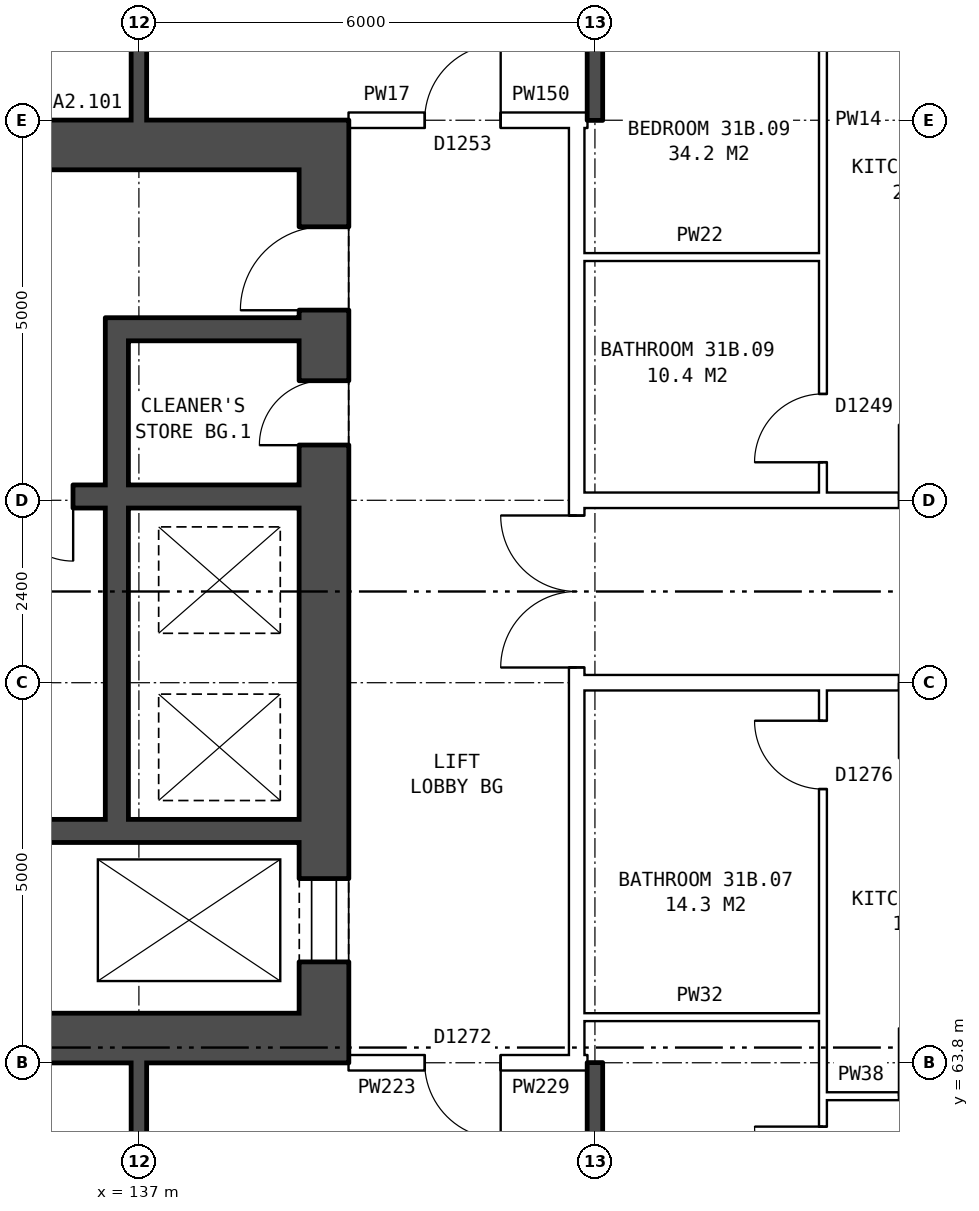
"""IFC4 building model, lengths in metres.
Left out: names, types, materials, properties, quantities, classifications, styles, units other than length and angle.
Written with IfcOpenShell. Run it as: python <this file> out.ifc"""

import sys

from ifc_helpers import new_model, si_unit, direction, frame, frame_2d, origin, place, context, subcontext, project, spatial, rectangle, extrude, element, fill, save


model = new_model("IFC4")
c1 = context("Model", 3, precision=1e-05, world=origin(), true_north=direction((0.0, 1.0)))
c2 = subcontext(c1, "Body", "Model", "MODEL_VIEW")
j1 = project(units=[si_unit("LENGTHUNIT", "METRE"), si_unit("PLANEANGLEUNIT", "RADIAN")], contexts=[c1])
p1 = place(None, origin())
s1 = spatial("IfcSite", under=j1, at=p1, CompositionType="ELEMENT")
p2 = place(p1, origin())
s2 = spatial("IfcBuilding", under=s1, at=p2, CompositionType="ELEMENT")
p3 = place(p2, frame((0.0, 0.0, 111.9)))
s3 = spatial("IfcBuildingStorey", under=s2, at=p3, CompositionType="ELEMENT", Elevation=111.9)
p4 = place(p3, frame((139.435, 64.45, 0.0), z_axis=(0.0, 0.0, 1.0), x_axis=(0.0, 1.0, 0.0)))
e1 = element("IfcWall", 1, at=p4, inside=s3, PredefinedType="SHEAR", context=c2, shape_type="SweptSolid", body=[
    extrude(rectangle(XDim=11.1, YDim=0.65, at=frame_2d((5.55, 0.0))), origin(), (0.0, 0.0, 1.0), 2.85),
])
p5 = place(p4, frame((0.675, 0.0, 0.0)))
e2 = element("IfcOpeningElement", 2, at=p5, cuts=e1, PredefinedType="OPENING", context=c2, shape_type="SweptSolid", body=[
    extrude(rectangle(XDim=1.1, YDim=2.1, at=frame_2d((0.55, 1.05))), frame((0.0, 0.335, 0.0), z_axis=(0.0, -1.0, 0.0), x_axis=(1.0, 0.0, 0.0)), (0.0, 0.0, 1.0), 0.67),
])
p6 = place(p4, frame((9.25, 0.0, 0.0)))
e3 = element("IfcOpeningElement", 3, at=p6, cuts=e1, PredefinedType="OPENING", context=c2, shape_type="SweptSolid", body=[
    extrude(rectangle(XDim=1.1, YDim=2.1, at=frame_2d((0.55, 1.05))), frame((0.0, 0.335, 0.0), z_axis=(0.0, -1.0, 0.0), x_axis=(1.0, 0.0, 0.0)), (0.0, 0.0, 1.0), 0.67),
])
p7 = place(p4, frame((7.475, 0.0, 0.0)))
e4 = element("IfcOpeningElement", 4, at=p7, cuts=e1, PredefinedType="OPENING", context=c2, shape_type="SweptSolid", body=[
    extrude(rectangle(XDim=0.85, YDim=2.1, at=frame_2d((0.425, 1.05))), frame((0.0, 0.335, 0.0), z_axis=(0.0, -1.0, 0.0), x_axis=(1.0, 0.0, 0.0)), (0.0, 0.0, 1.0), 0.67),
])
for number, where, z_axis, x_axis in (
    (5, (139.76, 64.125, 0.0), (0.0, 0.0, 1.0), (-1.0, 0.0, 0.0)),
    (6, (139.76, 75.875, 0.0), (0.0, 0.0, 1.0), (-1.0, 0.0, 0.0)),
):
    element("IfcWall", number, at=place(p3, frame(where, z_axis=z_axis, x_axis=x_axis)), inside=s3, PredefinedType="SHEAR", context=c2, shape_type="SweptSolid", body=[
        extrude(rectangle(XDim=8.4, YDim=0.65, at=frame_2d((4.2, 0.0))), origin(), (0.0, 0.0, 1.0), 2.85),
    ])
p8 = place(p3, frame((139.11, 66.85, 0.0), z_axis=(0.0, 0.0, 1.0), x_axis=(-1.0, 0.0, 0.0)))
e7 = element("IfcWall", 7, at=p8, inside=s3, PredefinedType="SHEAR", context=c2, shape_type="SweptSolid", body=[
    extrude(rectangle(XDim=4.25, YDim=0.3, at=frame_2d((2.125, 0.0))), origin(), (0.0, 0.0, 1.0), 2.85),
])
p9 = place(p3, frame((139.11, 71.25, 0.0), z_axis=(0.0, 0.0, 1.0), x_axis=(-1.0, 0.0, 0.0)))
e8 = element("IfcWall", 8, at=p9, inside=s3, PredefinedType="SHEAR", context=c2, shape_type="SweptSolid", body=[
    extrude(rectangle(XDim=7.1, YDim=0.3, at=frame_2d((3.55, 0.0))), origin(), (0.0, 0.0, 1.0), 2.85),
])
p10 = place(p9, frame((4.7, 0.0, 0.0)))
e9 = element("IfcOpeningElement", 9, at=p10, cuts=e8, PredefinedType="OPENING", context=c2, shape_type="SweptSolid", body=[
    extrude(rectangle(XDim=1.1, YDim=2.1, at=frame_2d((0.55, 1.05))), frame((0.0, 0.16, 0.0), z_axis=(0.0, -1.0, 0.0), x_axis=(1.0, 0.0, 0.0)), (0.0, 0.0, 1.0), 0.32),
])
p11 = place(p9, frame((2.975, 0.0, 0.0)))
e10 = element("IfcOpeningElement", 10, at=p11, cuts=e8, PredefinedType="OPENING", context=c2, shape_type="SweptSolid", body=[
    extrude(rectangle(XDim=0.85, YDim=2.1, at=frame_2d((0.425, 1.05))), frame((0.0, 0.16, 0.0), z_axis=(0.0, -1.0, 0.0), x_axis=(1.0, 0.0, 0.0)), (0.0, 0.0, 1.0), 0.32),
])
p12 = place(p3, frame((139.11, 73.45, 0.0), z_axis=(0.0, 0.0, 1.0), x_axis=(-1.0, 0.0, 0.0)))
e11 = element("IfcWall", 11, at=p12, inside=s3, PredefinedType="SHEAR", context=c2, shape_type="SweptSolid", body=[
    extrude(rectangle(XDim=2.25, YDim=0.3, at=frame_2d((1.125, 0.0))), origin(), (0.0, 0.0, 1.0), 2.85),
])
p13 = place(p3, frame((136.71, 67.0, 0.0), z_axis=(0.0, 0.0, 1.0), x_axis=(0.0, 1.0, 0.0)))
e12 = element("IfcWall", 12, at=p13, inside=s3, PredefinedType="SHEAR", context=c2, shape_type="SweptSolid", body=[
    extrude(rectangle(XDim=4.1, YDim=0.3, at=frame_2d((2.05, 0.0))), origin(), (0.0, 0.0, 1.0), 2.85),
])
p14 = place(p3, frame((136.71, 71.4, 0.0), z_axis=(0.0, 0.0, 1.0), x_axis=(0.0, 1.0, 0.0)))
e13 = element("IfcWall", 13, at=p14, inside=s3, PredefinedType="SHEAR", context=c2, shape_type="SweptSolid", body=[
    extrude(rectangle(XDim=2.2, YDim=0.3, at=frame_2d((1.1, 0.0))), origin(), (0.0, 0.0, 1.0), 2.85),
])
p15 = place(p3, frame((142.76, 63.9, 0.0), z_axis=(0.0, 0.0, 1.0), x_axis=(0.0, 1.0, 0.0)))
e14 = element("IfcWall", 14, at=p15, inside=s3, PredefinedType="PARTITIONING", context=c2, shape_type="SweptSolid", body=[
    extrude(rectangle(XDim=12.2, YDim=0.2, at=frame_2d((6.1, 0.0))), origin(), (0.0, 0.0, 1.0), 2.85),
])
p16 = place(p15, frame((5.1, 0.0, 0.0)))
e15 = element("IfcOpeningElement", 15, at=p16, cuts=e14, PredefinedType="OPENING", context=c2, shape_type="SweptSolid", body=[
    extrude(rectangle(XDim=2.0, YDim=2.1, at=frame_2d((1.0, 1.05))), frame((0.0, 0.11, 0.0), z_axis=(0.0, -1.0, 0.0), x_axis=(1.0, 0.0, 0.0)), (0.0, 0.0, 1.0), 0.22),
])
p17 = place(p3, frame((146.0, 63.36, 0.0), z_axis=(0.0, 0.0, 1.0), x_axis=(1.0, 0.0, 0.0)))
e16 = element("IfcWall", 16, at=p17, inside=s3, PredefinedType="PARTITIONING", context=c2, shape_type="SweptSolid", body=[
    extrude(rectangle(XDim=2.9, YDim=0.1, at=frame_2d((1.45, 0.0))), origin(), (0.0, 0.0, 1.0), 2.85),
])
p18 = place(p17, frame((1.0, 0.0, 0.0)))
e17 = element("IfcOpeningElement", 17, at=p18, cuts=e16, PredefinedType="OPENING", context=c2, shape_type="SweptSolid", body=[
    extrude(rectangle(XDim=0.9, YDim=2.1, at=frame_2d((0.45, 1.05))), frame((0.0, 0.06, 0.0), z_axis=(0.0, -1.0, 0.0), x_axis=(1.0, 0.0, 0.0)), (0.0, 0.0, 1.0), 0.12),
])
p19 = place(p3, frame((139.76, 63.8, 0.0), z_axis=(0.0, 0.0, 1.0), x_axis=(1.0, 0.0, 0.0)))
e18 = element("IfcWall", 18, at=p19, inside=s3, PredefinedType="PARTITIONING", context=c2, shape_type="SweptSolid", body=[
    extrude(rectangle(XDim=3.0, YDim=0.2, at=frame_2d((1.5, 0.0))), origin(), (0.0, 0.0, 1.0), 2.85),
])
p20 = place(p19, frame((1.0, 0.0, 0.0)))
e19 = element("IfcOpeningElement", 19, at=p20, cuts=e18, PredefinedType="OPENING", context=c2, shape_type="SweptSolid", body=[
    extrude(rectangle(XDim=1.0, YDim=2.1, at=frame_2d((0.5, 1.05))), frame((0.0, 0.11, 0.0), z_axis=(0.0, -1.0, 0.0), x_axis=(1.0, 0.0, 0.0)), (0.0, 0.0, 1.0), 0.22),
])
p21 = place(p3, frame((142.76, 63.8, 0.0), z_axis=(0.0, 0.0, 1.0), x_axis=(1.0, 0.0, 0.0)))
e20 = element("IfcWall", 20, at=p21, inside=s3, PredefinedType="PARTITIONING", context=c2, shape_type="SweptSolid", body=[
    extrude(rectangle(XDim=0.14, YDim=0.2, at=frame_2d((0.07, 0.0))), origin(), (0.0, 0.0, 1.0), 2.85),
])
p22 = place(p3, frame((142.76, 64.4, 0.0), z_axis=(0.0, 0.0, 1.0), x_axis=(1.0, 0.0, 0.0)))
e21 = element("IfcWall", 21, at=p22, inside=s3, PredefinedType="PARTITIONING", context=c2, shape_type="SweptSolid", body=[
    extrude(rectangle(XDim=3.24, YDim=0.1, at=frame_2d((1.62, 0.0))), origin(), (0.0, 0.0, 1.0), 2.85),
])
p23 = place(p3, frame((142.76, 68.8, 0.0), z_axis=(0.0, 0.0, 1.0), x_axis=(1.0, 0.0, 0.0)))
e22 = element("IfcWall", 22, at=p23, inside=s3, PredefinedType="PARTITIONING", context=c2, shape_type="SweptSolid", body=[
    extrude(rectangle(XDim=14.48, YDim=0.2, at=frame_2d((7.24, 0.0))), origin(), (0.0, 0.0, 1.0), 2.85),
])
p24 = place(p23, frame((4.24, 0.0, 0.0)))
e23 = element("IfcOpeningElement", 23, at=p24, cuts=e22, PredefinedType="OPENING", context=c2, shape_type="SweptSolid", body=[
    extrude(rectangle(XDim=1.0, YDim=2.1, at=frame_2d((0.5, 1.05))), frame((0.0, 0.11, 0.0), z_axis=(0.0, -1.0, 0.0), x_axis=(1.0, 0.0, 0.0)), (0.0, 0.0, 1.0), 0.22),
])
p25 = place(p23, frame((10.24, 0.0, 0.0)))
e24 = element("IfcOpeningElement", 24, at=p25, cuts=e22, PredefinedType="OPENING", context=c2, shape_type="SweptSolid", body=[
    extrude(rectangle(XDim=1.0, YDim=2.1, at=frame_2d((0.5, 1.05))), frame((0.0, 0.11, 0.0), z_axis=(0.0, -1.0, 0.0), x_axis=(1.0, 0.0, 0.0)), (0.0, 0.0, 1.0), 0.22),
])
p26 = place(p3, frame((142.76, 71.2, 0.0), z_axis=(0.0, 0.0, 1.0), x_axis=(1.0, 0.0, 0.0)))
e25 = element("IfcWall", 25, at=p26, inside=s3, PredefinedType="PARTITIONING", context=c2, shape_type="SweptSolid", body=[
    extrude(rectangle(XDim=14.48, YDim=0.2, at=frame_2d((7.24, 0.0))), origin(), (0.0, 0.0, 1.0), 2.85),
])
p27 = place(p26, frame((4.24, 0.0, 0.0)))
e26 = element("IfcOpeningElement", 26, at=p27, cuts=e25, PredefinedType="OPENING", context=c2, shape_type="SweptSolid", body=[
    extrude(rectangle(XDim=1.0, YDim=2.1, at=frame_2d((0.5, 1.05))), frame((0.0, 0.11, 0.0), z_axis=(0.0, -1.0, 0.0), x_axis=(1.0, 0.0, 0.0)), (0.0, 0.0, 1.0), 0.22),
])
p28 = place(p26, frame((10.24, 0.0, 0.0)))
e27 = element("IfcOpeningElement", 27, at=p28, cuts=e25, PredefinedType="OPENING", context=c2, shape_type="SweptSolid", body=[
    extrude(rectangle(XDim=1.0, YDim=2.1, at=frame_2d((0.5, 1.05))), frame((0.0, 0.11, 0.0), z_axis=(0.0, -1.0, 0.0), x_axis=(1.0, 0.0, 0.0)), (0.0, 0.0, 1.0), 0.22),
])
p29 = place(p3, frame((142.76, 74.4, 0.0), z_axis=(0.0, 0.0, 1.0), x_axis=(1.0, 0.0, 0.0)))
e28 = element("IfcWall", 28, at=p29, inside=s3, PredefinedType="PARTITIONING", context=c2, shape_type="SweptSolid", body=[
    extrude(rectangle(XDim=3.24, YDim=0.1, at=frame_2d((1.62, 0.0))), origin(), (0.0, 0.0, 1.0), 2.85),
])
p30 = place(p3, frame((139.76, 76.2, 0.0), z_axis=(0.0, 0.0, 1.0), x_axis=(1.0, 0.0, 0.0)))
e29 = element("IfcWall", 29, at=p30, inside=s3, PredefinedType="PARTITIONING", context=c2, shape_type="SweptSolid", body=[
    extrude(rectangle(XDim=3.0, YDim=0.2, at=frame_2d((1.5, 0.0))), origin(), (0.0, 0.0, 1.0), 2.85),
])
p31 = place(p30, frame((1.0, 0.0, 0.0)))
e30 = element("IfcOpeningElement", 30, at=p31, cuts=e29, PredefinedType="OPENING", context=c2, shape_type="SweptSolid", body=[
    extrude(rectangle(XDim=1.0, YDim=2.1, at=frame_2d((0.5, 1.05))), frame((0.0, 0.11, 0.0), z_axis=(0.0, -1.0, 0.0), x_axis=(1.0, 0.0, 0.0)), (0.0, 0.0, 1.0), 0.22),
])
p32 = place(p3, frame((142.76, 76.2, 0.0), z_axis=(0.0, 0.0, 1.0), x_axis=(1.0, 0.0, 0.0)))
e31 = element("IfcWall", 31, at=p32, inside=s3, PredefinedType="PARTITIONING", context=c2, shape_type="SweptSolid", body=[
    extrude(rectangle(XDim=0.14, YDim=0.2, at=frame_2d((0.07, 0.0))), origin(), (0.0, 0.0, 1.0), 2.85),
])
p33 = place(p3, frame((137.0, 54.36, 0.0), z_axis=(0.0, 0.0, 1.0), x_axis=(0.0, 1.0, 0.0)))
e32 = element("IfcWall", 32, at=p33, inside=s3, PredefinedType="SOLIDWALL", context=c2, shape_type="SweptSolid", body=[
    extrude(rectangle(XDim=9.44, YDim=0.2, at=frame_2d((4.72, 0.0))), origin(), (0.0, 0.0, 1.0), 2.85),
])
p34 = place(p33, frame((7.19, 0.0, 0.0)))
e33 = element("IfcOpeningElement", 33, at=p34, cuts=e32, PredefinedType="OPENING", context=c2, shape_type="SweptSolid", body=[
    extrude(rectangle(XDim=0.9, YDim=2.1, at=frame_2d((0.45, 1.05))), frame((0.0, 0.11, 0.0), z_axis=(0.0, -1.0, 0.0), x_axis=(1.0, 0.0, 0.0)), (0.0, 0.0, 1.0), 0.22),
])
p35 = place(p3, frame((137.0, 76.2, 0.0), z_axis=(0.0, 0.0, 1.0), x_axis=(0.0, 1.0, 0.0)))
e34 = element("IfcWall", 34, at=p35, inside=s3, PredefinedType="SOLIDWALL", context=c2, shape_type="SweptSolid", body=[
    extrude(rectangle(XDim=9.44, YDim=0.2, at=frame_2d((4.72, 0.0))), origin(), (0.0, 0.0, 1.0), 2.85),
])
p36 = place(p35, frame((6.07, 0.0, 0.0)))
e35 = element("IfcOpeningElement", 35, at=p36, cuts=e34, PredefinedType="OPENING", context=c2, shape_type="SweptSolid", body=[
    extrude(rectangle(XDim=0.9, YDim=2.1, at=frame_2d((0.45, 1.05))), frame((0.0, 0.11, 0.0), z_axis=(0.0, -1.0, 0.0), x_axis=(1.0, 0.0, 0.0)), (0.0, 0.0, 1.0), 0.22),
])
p37 = place(p35, frame((0.95, 0.0, 0.0)))
e36 = element("IfcOpeningElement", 36, at=p37, cuts=e34, PredefinedType="OPENING", context=c2, shape_type="SweptSolid", body=[
    extrude(rectangle(XDim=0.9, YDim=2.1, at=frame_2d((0.45, 1.05))), frame((0.0, 0.11, 0.0), z_axis=(0.0, -1.0, 0.0), x_axis=(1.0, 0.0, 0.0)), (0.0, 0.0, 1.0), 0.22),
])
for number, where, z_axis, x_axis in (
    (37, (143.0, 54.36, 0.0), (0.0, 0.0, 1.0), (0.0, 1.0, 0.0)),
    (38, (143.0, 76.2, 0.0), (0.0, 0.0, 1.0), (0.0, 1.0, 0.0)),
):
    element("IfcWall", number, at=place(p3, frame(where, z_axis=z_axis, x_axis=x_axis)), inside=s3, PredefinedType="SOLIDWALL", context=c2, shape_type="SweptSolid", body=[
        extrude(rectangle(XDim=9.44, YDim=0.2, at=frame_2d((4.72, 0.0))), origin(), (0.0, 0.0, 1.0), 2.85),
    ])
p38 = place(p3, frame((146.0, 54.36, 0.0), z_axis=(0.0, 0.0, 1.0), x_axis=(0.0, 1.0, 0.0)))
e39 = element("IfcWall", 39, at=p38, inside=s3, PredefinedType="PARTITIONING", context=c2, shape_type="SweptSolid", body=[
    extrude(rectangle(XDim=14.34, YDim=0.1, at=frame_2d((7.17, 0.0))), origin(), (0.0, 0.0, 1.0), 2.85),
])
p39 = place(p38, frame((7.7, 0.0, 0.0)))
e40 = element("IfcOpeningElement", 40, at=p39, cuts=e39, PredefinedType="OPENING", context=c2, shape_type="SweptSolid", body=[
    extrude(rectangle(XDim=0.9, YDim=2.1, at=frame_2d((0.45, 1.05))), frame((0.0, 0.06, 0.0), z_axis=(0.0, -1.0, 0.0), x_axis=(1.0, 0.0, 0.0)), (0.0, 0.0, 1.0), 0.12),
])
p40 = place(p38, frame((13.04, 0.0, 0.0)))
e41 = element("IfcOpeningElement", 41, at=p40, cuts=e39, PredefinedType="OPENING", context=c2, shape_type="SweptSolid", body=[
    extrude(rectangle(XDim=0.9, YDim=2.1, at=frame_2d((0.45, 1.05))), frame((0.0, 0.06, 0.0), z_axis=(0.0, -1.0, 0.0), x_axis=(1.0, 0.0, 0.0)), (0.0, 0.0, 1.0), 0.12),
])
p41 = place(p3, frame((146.0, 71.3, 0.0), z_axis=(0.0, 0.0, 1.0), x_axis=(0.0, 1.0, 0.0)))
e42 = element("IfcWall", 42, at=p41, inside=s3, PredefinedType="PARTITIONING", context=c2, shape_type="SweptSolid", body=[
    extrude(rectangle(XDim=14.34, YDim=0.1, at=frame_2d((7.17, 0.0))), origin(), (0.0, 0.0, 1.0), 2.85),
])
p42 = place(p41, frame((7.94, 0.0, 0.0)))
e43 = element("IfcOpeningElement", 43, at=p42, cuts=e42, PredefinedType="OPENING", context=c2, shape_type="SweptSolid", body=[
    extrude(rectangle(XDim=0.9, YDim=2.1, at=frame_2d((0.45, 1.05))), frame((0.0, 0.06, 0.0), z_axis=(0.0, -1.0, 0.0), x_axis=(1.0, 0.0, 0.0)), (0.0, 0.0, 1.0), 0.12),
])
p43 = place(p41, frame((0.4, 0.0, 0.0)))
e44 = element("IfcOpeningElement", 44, at=p43, cuts=e42, PredefinedType="OPENING", context=c2, shape_type="SweptSolid", body=[
    extrude(rectangle(XDim=0.9, YDim=2.1, at=frame_2d((0.45, 1.05))), frame((0.0, 0.06, 0.0), z_axis=(0.0, -1.0, 0.0), x_axis=(1.0, 0.0, 0.0)), (0.0, 0.0, 1.0), 0.12),
])
p44 = place(p5, origin())
e45 = element("IfcDoor", 45, at=p44, inside=s3, OperationType="DOUBLE_DOOR_SLIDING", PredefinedType="DOOR", context=c2, shape_type="SweptSolid", body=[
    extrude(rectangle(XDim=1.1, YDim=2.1, at=frame_2d((0.55, 1.05))), frame((0.0, 0.31, 0.0), z_axis=(0.0, -1.0, 0.0), x_axis=(1.0, 0.0, 0.0)), (0.0, 0.0, 1.0), 0.05),
])
fill(e2, e45)
p45 = place(p6, origin())
e46 = element("IfcDoor", 46, at=p45, inside=s3, OperationType="SINGLE_SWING_LEFT", PredefinedType="DOOR", context=c2, shape_type="SweptSolid", body=[
    extrude(rectangle(XDim=1.1, YDim=2.1, at=frame_2d((0.55, 1.05))), frame((0.0, 0.31, 0.0), z_axis=(0.0, -1.0, 0.0), x_axis=(1.0, 0.0, 0.0)), (0.0, 0.0, 1.0), 0.05),
])
fill(e3, e46)
p46 = place(p7, origin())
e47 = element("IfcDoor", 47, at=p46, inside=s3, OperationType="SINGLE_SWING_LEFT", PredefinedType="DOOR", context=c2, shape_type="SweptSolid", body=[
    extrude(rectangle(XDim=0.85, YDim=2.1, at=frame_2d((0.425, 1.05))), frame((0.0, 0.31, 0.0), z_axis=(0.0, -1.0, 0.0), x_axis=(1.0, 0.0, 0.0)), (0.0, 0.0, 1.0), 0.05),
])
fill(e4, e47)
p47 = place(p11, origin())
e48 = element("IfcDoor", 48, at=p47, inside=s3, OperationType="SINGLE_SWING_LEFT", PredefinedType="DOOR", context=c2, shape_type="SweptSolid", body=[
    extrude(rectangle(XDim=0.85, YDim=2.1, at=frame_2d((0.425, 1.05))), frame((0.0, 0.025, 0.0), z_axis=(0.0, -1.0, 0.0), x_axis=(1.0, 0.0, 0.0)), (0.0, 0.0, 1.0), 0.05),
])
fill(e10, e48)
p48 = place(p16, origin())
e49 = element("IfcDoor", 49, at=p48, inside=s3, OperationType="DOUBLE_DOOR_SINGLE_SWING", PredefinedType="DOOR", context=c2, shape_type="SweptSolid", body=[
    extrude(rectangle(XDim=2.0, YDim=2.1, at=frame_2d((1.0, 1.05))), frame((0.0, 0.025, 0.0), z_axis=(0.0, -1.0, 0.0), x_axis=(1.0, 0.0, 0.0)), (0.0, 0.0, 1.0), 0.05),
])
fill(e15, e49)
p49 = place(p20, frame((1.0, 0.0, 0.0), z_axis=(0.0, 0.0, 1.0), x_axis=(-1.0, 0.0, 0.0)))
e50 = element("IfcDoor", 50, at=p49, inside=s3, OperationType="SINGLE_SWING_LEFT", PredefinedType="DOOR", context=c2, shape_type="SweptSolid", body=[
    extrude(rectangle(XDim=1.0, YDim=2.1, at=frame_2d((0.5, 1.05))), frame((0.0, 0.025, 0.0), z_axis=(0.0, -1.0, 0.0), x_axis=(1.0, 0.0, 0.0)), (0.0, 0.0, 1.0), 0.05),
])
fill(e19, e50)
p50 = place(p31, origin())
e51 = element("IfcDoor", 51, at=p50, inside=s3, OperationType="SINGLE_SWING_RIGHT", PredefinedType="DOOR", context=c2, shape_type="SweptSolid", body=[
    extrude(rectangle(XDim=1.0, YDim=2.1, at=frame_2d((0.5, 1.05))), frame((0.0, 0.025, 0.0), z_axis=(0.0, -1.0, 0.0), x_axis=(1.0, 0.0, 0.0)), (0.0, 0.0, 1.0), 0.05),
])
fill(e30, e51)
p51 = place(p39, origin())
e52 = element("IfcDoor", 52, at=p51, inside=s3, OperationType="SINGLE_SWING_RIGHT", PredefinedType="DOOR", context=c2, shape_type="SweptSolid", body=[
    extrude(rectangle(XDim=0.9, YDim=2.1, at=frame_2d((0.45, 1.05))), frame((0.0, 0.025, 0.0), z_axis=(0.0, -1.0, 0.0), x_axis=(1.0, 0.0, 0.0)), (0.0, 0.0, 1.0), 0.05),
])
fill(e40, e52)
p52 = place(p40, origin())
e53 = element("IfcDoor", 53, at=p52, inside=s3, OperationType="SINGLE_SWING_RIGHT", PredefinedType="DOOR", context=c2, shape_type="SweptSolid", body=[
    extrude(rectangle(XDim=0.9, YDim=2.1, at=frame_2d((0.45, 1.05))), frame((0.0, 0.025, 0.0), z_axis=(0.0, -1.0, 0.0), x_axis=(1.0, 0.0, 0.0)), (0.0, 0.0, 1.0), 0.05),
])
fill(e41, e53)
p53 = place(p43, origin())
e54 = element("IfcDoor", 54, at=p53, inside=s3, OperationType="SINGLE_SWING_LEFT", PredefinedType="DOOR", context=c2, shape_type="SweptSolid", body=[
    extrude(rectangle(XDim=0.9, YDim=2.1, at=frame_2d((0.45, 1.05))), frame((0.0, 0.025, 0.0), z_axis=(0.0, -1.0, 0.0), x_axis=(1.0, 0.0, 0.0)), (0.0, 0.0, 1.0), 0.05),
])
fill(e44, e54)
save(model, sys.argv[1])
